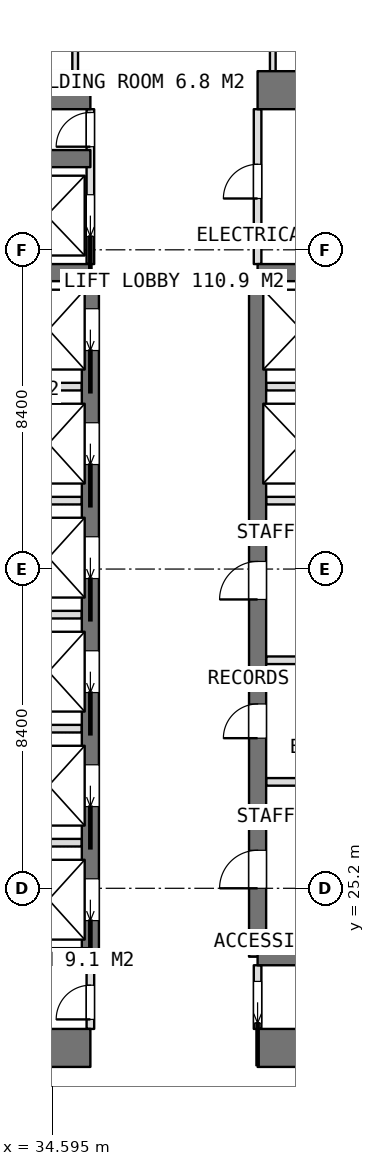
"""IFC4 building model, lengths in metres.
Left out: names, types, materials, properties, quantities, classifications, styles, units other than length and angle.
Written with IfcOpenShell. Run it as: python <this file> out.ifc"""

import sys

from ifc_helpers import new_model, si_unit, direction, frame, frame_2d, origin, place, context, subcontext, project, spatial, rectangle, extrude, element, fill, save


model = new_model("IFC4")
c1 = context("Model", 3, precision=1e-05, world=origin(), true_north=direction((0.0, 1.0)))
c2 = subcontext(c1, "Body", "Model", "MODEL_VIEW")
j1 = project(units=[si_unit("LENGTHUNIT", "METRE"), si_unit("PLANEANGLEUNIT", "RADIAN")], contexts=[c1])
p1 = place(None, origin())
s1 = spatial("IfcSite", under=j1, at=p1, CompositionType="ELEMENT")
p2 = place(p1, origin())
s2 = spatial("IfcBuilding", under=s1, at=p2, CompositionType="ELEMENT")
p3 = place(p2, frame((0.0, 0.0, 183.95)))
s3 = spatial("IfcBuildingStorey", under=s2, at=p3, CompositionType="ELEMENT", Elevation=183.95)
p4 = place(p3, frame((25.2, 21.0, 0.0), z_axis=(0.0, 0.0, 1.0), x_axis=(1.0, 0.0, 0.0)))
e1 = element("IfcWall", 1, at=p4, inside=s3, PredefinedType="SHEAR", context=c2, shape_type="SweptSolid", body=[
    extrude(rectangle(XDim=10.4, YDim=1.0, at=frame_2d((5.2, 0.0))), origin(), (0.0, 0.0, 1.0), 3.75),
])
p5 = place(p3, frame((40.0, 21.0, 0.0), z_axis=(0.0, 0.0, 1.0), x_axis=(1.0, 0.0, 0.0)))
e2 = element("IfcWall", 2, at=p5, inside=s3, PredefinedType="SHEAR", context=c2, shape_type="SweptSolid", body=[
    extrude(rectangle(XDim=10.4, YDim=1.0, at=frame_2d((5.2, 0.0))), origin(), (0.0, 0.0, 1.0), 3.75),
])
p6 = place(p3, frame((25.2, 46.2, 0.0), z_axis=(0.0, 0.0, 1.0), x_axis=(1.0, 0.0, 0.0)))
e3 = element("IfcWall", 3, at=p6, inside=s3, PredefinedType="SHEAR", context=c2, shape_type="SweptSolid", body=[
    extrude(rectangle(XDim=10.4, YDim=1.0, at=frame_2d((5.2, 0.0))), origin(), (0.0, 0.0, 1.0), 3.75),
])
p7 = place(p3, frame((40.0, 46.2, 0.0), z_axis=(0.0, 0.0, 1.0), x_axis=(1.0, 0.0, 0.0)))
e4 = element("IfcWall", 4, at=p7, inside=s3, PredefinedType="SHEAR", context=c2, shape_type="SweptSolid", body=[
    extrude(rectangle(XDim=10.4, YDim=1.0, at=frame_2d((5.2, 0.0))), origin(), (0.0, 0.0, 1.0), 3.75),
])
p8 = place(p3, frame((35.6, 23.4, 0.0), z_axis=(0.0, 0.0, 1.0), x_axis=(0.0, 1.0, 0.0)))
e5 = element("IfcWall", 5, at=p8, inside=s3, PredefinedType="SHEAR", context=c2, shape_type="SweptSolid", body=[
    extrude(rectangle(XDim=18.0, YDim=0.45, at=frame_2d((9.0, 0.0))), origin(), (0.0, 0.0, 1.0), 3.75),
])
p9 = place(p8, frame((0.95, 0.0, 0.0)))
e6 = element("IfcOpeningElement", 6, at=p9, cuts=e5, PredefinedType="OPENING", context=c2, shape_type="SweptSolid", body=[
    extrude(rectangle(XDim=1.1, YDim=2.1, at=frame_2d((0.55, 1.05))), frame((0.0, 0.235, 0.0), z_axis=(0.0, -1.0, 0.0), x_axis=(1.0, 0.0, 0.0)), (0.0, 0.0, 1.0), 0.47),
])
p10 = place(p8, frame((3.95, 0.0, 0.0)))
e7 = element("IfcOpeningElement", 7, at=p10, cuts=e5, PredefinedType="OPENING", context=c2, shape_type="SweptSolid", body=[
    extrude(rectangle(XDim=1.1, YDim=2.1, at=frame_2d((0.55, 1.05))), frame((0.0, 0.235, 0.0), z_axis=(0.0, -1.0, 0.0), x_axis=(1.0, 0.0, 0.0)), (0.0, 0.0, 1.0), 0.47),
])
p11 = place(p8, frame((6.95, 0.0, 0.0)))
e8 = element("IfcOpeningElement", 8, at=p11, cuts=e5, PredefinedType="OPENING", context=c2, shape_type="SweptSolid", body=[
    extrude(rectangle(XDim=1.1, YDim=2.1, at=frame_2d((0.55, 1.05))), frame((0.0, 0.235, 0.0), z_axis=(0.0, -1.0, 0.0), x_axis=(1.0, 0.0, 0.0)), (0.0, 0.0, 1.0), 0.47),
])
p12 = place(p8, frame((9.95, 0.0, 0.0)))
e9 = element("IfcOpeningElement", 9, at=p12, cuts=e5, PredefinedType="OPENING", context=c2, shape_type="SweptSolid", body=[
    extrude(rectangle(XDim=1.1, YDim=2.1, at=frame_2d((0.55, 1.05))), frame((0.0, 0.235, 0.0), z_axis=(0.0, -1.0, 0.0), x_axis=(1.0, 0.0, 0.0)), (0.0, 0.0, 1.0), 0.47),
])
p13 = place(p8, frame((12.95, 0.0, 0.0)))
e10 = element("IfcOpeningElement", 10, at=p13, cuts=e5, PredefinedType="OPENING", context=c2, shape_type="SweptSolid", body=[
    extrude(rectangle(XDim=1.1, YDim=2.1, at=frame_2d((0.55, 1.05))), frame((0.0, 0.235, 0.0), z_axis=(0.0, -1.0, 0.0), x_axis=(1.0, 0.0, 0.0)), (0.0, 0.0, 1.0), 0.47),
])
p14 = place(p8, frame((15.95, 0.0, 0.0)))
e11 = element("IfcOpeningElement", 11, at=p14, cuts=e5, PredefinedType="OPENING", context=c2, shape_type="SweptSolid", body=[
    extrude(rectangle(XDim=1.1, YDim=2.1, at=frame_2d((0.55, 1.05))), frame((0.0, 0.235, 0.0), z_axis=(0.0, -1.0, 0.0), x_axis=(1.0, 0.0, 0.0)), (0.0, 0.0, 1.0), 0.47),
])
p15 = place(p3, frame((40.0, 23.4, 0.0), z_axis=(0.0, 0.0, 1.0), x_axis=(0.0, 1.0, 0.0)))
e12 = element("IfcWall", 12, at=p15, inside=s3, PredefinedType="SHEAR", context=c2, shape_type="SweptSolid", body=[
    extrude(rectangle(XDim=18.0, YDim=0.45, at=frame_2d((9.0, 0.0))), origin(), (0.0, 0.0, 1.0), 3.75),
])
p16 = place(p15, frame((1.8, 0.0, 0.0)))
e13 = element("IfcOpeningElement", 13, at=p16, cuts=e12, PredefinedType="OPENING", context=c2, shape_type="SweptSolid", body=[
    extrude(rectangle(XDim=1.0, YDim=2.1, at=frame_2d((0.5, 1.05))), frame((0.0, 0.235, 0.0), z_axis=(0.0, -1.0, 0.0), x_axis=(1.0, 0.0, 0.0)), (0.0, 0.0, 1.0), 0.47),
])
p17 = place(p15, frame((5.75, 0.0, 0.0)))
e14 = element("IfcOpeningElement", 14, at=p17, cuts=e12, PredefinedType="OPENING", context=c2, shape_type="SweptSolid", body=[
    extrude(rectangle(XDim=0.9, YDim=2.1, at=frame_2d((0.45, 1.05))), frame((0.0, 0.235, 0.0), z_axis=(0.0, -1.0, 0.0), x_axis=(1.0, 0.0, 0.0)), (0.0, 0.0, 1.0), 0.47),
])
p18 = place(p15, frame((9.4, 0.0, 0.0)))
e15 = element("IfcOpeningElement", 15, at=p18, cuts=e12, PredefinedType="OPENING", context=c2, shape_type="SweptSolid", body=[
    extrude(rectangle(XDim=1.0, YDim=2.1, at=frame_2d((0.5, 1.05))), frame((0.0, 0.235, 0.0), z_axis=(0.0, -1.0, 0.0), x_axis=(1.0, 0.0, 0.0)), (0.0, 0.0, 1.0), 0.47),
])
for number, where, z_axis, x_axis in (
    (16, (31.8, 23.4, 0.0), (0.0, 0.0, 1.0), (1.0, 0.0, 0.0)),
    (17, (31.8, 41.4, 0.0), (0.0, 0.0, 1.0), (1.0, 0.0, 0.0)),
    (18, (31.8, 44.4, 0.0), (0.0, 0.0, 1.0), (1.0, 0.0, 0.0)),
    (19, (40.0, 23.4, 0.0), (0.0, 0.0, 1.0), (1.0, 0.0, 0.0)),
    (20, (40.0, 41.4, 0.0), (0.0, 0.0, 1.0), (1.0, 0.0, 0.0)),
):
    element("IfcWall", number, at=place(p3, frame(where, z_axis=z_axis, x_axis=x_axis)), inside=s3, PredefinedType="SHEAR", context=c2, shape_type="SweptSolid", body=[
        extrude(rectangle(XDim=3.8, YDim=0.45, at=frame_2d((1.9, 0.0))), origin(), (0.0, 0.0, 1.0), 3.75),
    ])
for number, where, z_axis, x_axis in (
    (21, (32.025, 26.4, 0.0), (0.0, 0.0, 1.0), (1.0, 0.0, 0.0)),
    (22, (32.025, 29.4, 0.0), (0.0, 0.0, 1.0), (1.0, 0.0, 0.0)),
    (23, (32.025, 32.4, 0.0), (0.0, 0.0, 1.0), (1.0, 0.0, 0.0)),
    (24, (32.025, 35.4, 0.0), (0.0, 0.0, 1.0), (1.0, 0.0, 0.0)),
    (25, (32.025, 38.4, 0.0), (0.0, 0.0, 1.0), (1.0, 0.0, 0.0)),
):
    element("IfcWall", number, at=place(p3, frame(where, z_axis=z_axis, x_axis=x_axis)), inside=s3, PredefinedType="PARTITIONING", context=c2, shape_type="SweptSolid", body=[
        extrude(rectangle(XDim=3.35, YDim=0.2, at=frame_2d((1.675, 0.0))), origin(), (0.0, 0.0, 1.0), 3.5),
    ])
for number, where, z_axis, x_axis in (
    (26, (40.225, 35.4, 0.0), (0.0, 0.0, 1.0), (1.0, 0.0, 0.0)),
    (27, (40.225, 38.4, 0.0), (0.0, 0.0, 1.0), (1.0, 0.0, 0.0)),
):
    element("IfcWall", number, at=place(p3, frame(where, z_axis=z_axis, x_axis=x_axis)), inside=s3, PredefinedType="PARTITIONING", context=c2, shape_type="SweptSolid", body=[
        extrude(rectangle(XDim=3.35, YDim=0.2, at=frame_2d((1.675, 0.0))), origin(), (0.0, 0.0, 1.0), 3.5),
    ])
p19 = place(p3, frame((40.0, 21.5, 0.0), z_axis=(0.0, 0.0, 1.0), x_axis=(0.0, 1.0, 0.0)))
e28 = element("IfcWall", 28, at=p19, inside=s3, PredefinedType="PARTITIONING", context=c2, shape_type="SweptSolid", body=[
    extrude(rectangle(XDim=1.675, YDim=0.2, at=frame_2d((0.837, 0.0))), origin(), (0.0, 0.0, 1.0), 3.5),
])
p20 = place(p19, frame((0.15, 0.0, 0.0)))
e29 = element("IfcOpeningElement", 29, at=p20, cuts=e28, PredefinedType="OPENING", context=c2, shape_type="SweptSolid", body=[
    extrude(rectangle(XDim=1.1, YDim=2.1, at=frame_2d((0.55, 1.05))), frame((0.0, 0.11, 0.0), z_axis=(0.0, -1.0, 0.0), x_axis=(1.0, 0.0, 0.0)), (0.0, 0.0, 1.0), 0.22),
])
p21 = place(p3, frame((40.0, 41.625, 0.0), z_axis=(0.0, 0.0, 1.0), x_axis=(0.0, 1.0, 0.0)))
e30 = element("IfcWall", 30, at=p21, inside=s3, PredefinedType="PARTITIONING", context=c2, shape_type="SweptSolid", body=[
    extrude(rectangle(XDim=4.075, YDim=0.2, at=frame_2d((2.038, 0.0))), origin(), (0.0, 0.0, 1.0), 3.5),
])
p22 = place(p21, frame((1.725, 0.0, 0.0)))
e31 = element("IfcOpeningElement", 31, at=p22, cuts=e30, PredefinedType="OPENING", context=c2, shape_type="SweptSolid", body=[
    extrude(rectangle(XDim=0.9, YDim=2.1, at=frame_2d((0.45, 1.05))), frame((0.0, 0.11, 0.0), z_axis=(0.0, -1.0, 0.0), x_axis=(1.0, 0.0, 0.0)), (0.0, 0.0, 1.0), 0.22),
])
p23 = place(p3, frame((35.6, 41.625, 0.0), z_axis=(0.0, 0.0, 1.0), x_axis=(0.0, 1.0, 0.0)))
e32 = element("IfcWall", 32, at=p23, inside=s3, PredefinedType="PARTITIONING", context=c2, shape_type="SweptSolid", body=[
    extrude(rectangle(XDim=4.075, YDim=0.2, at=frame_2d((2.038, 0.0))), origin(), (0.0, 0.0, 1.0), 3.5),
])
p24 = place(p23, frame((3.088, 0.0, 0.0)))
e33 = element("IfcOpeningElement", 33, at=p24, cuts=e32, PredefinedType="OPENING", context=c2, shape_type="SweptSolid", body=[
    extrude(rectangle(XDim=0.9, YDim=2.1, at=frame_2d((0.45, 1.05))), frame((0.0, 0.11, 0.0), z_axis=(0.0, -1.0, 0.0), x_axis=(1.0, 0.0, 0.0)), (0.0, 0.0, 1.0), 0.22),
])
p25 = place(p23, frame((0.725, 0.0, 0.0)))
e34 = element("IfcOpeningElement", 34, at=p25, cuts=e32, PredefinedType="OPENING", context=c2, shape_type="SweptSolid", body=[
    extrude(rectangle(XDim=1.1, YDim=2.1, at=frame_2d((0.55, 1.05))), frame((0.0, 0.11, 0.0), z_axis=(0.0, -1.0, 0.0), x_axis=(1.0, 0.0, 0.0)), (0.0, 0.0, 1.0), 0.22),
])
p26 = place(p3, frame((35.6, 21.5, 0.0), z_axis=(0.0, 0.0, 1.0), x_axis=(0.0, 1.0, 0.0)))
e35 = element("IfcWall", 35, at=p26, inside=s3, PredefinedType="PARTITIONING", context=c2, shape_type="SweptSolid", body=[
    extrude(rectangle(XDim=1.675, YDim=0.2, at=frame_2d((0.837, 0.0))), origin(), (0.0, 0.0, 1.0), 3.5),
])
p27 = place(p26, frame((0.25, 0.0, 0.0)))
e36 = element("IfcOpeningElement", 36, at=p27, cuts=e35, PredefinedType="OPENING", context=c2, shape_type="SweptSolid", body=[
    extrude(rectangle(XDim=0.9, YDim=2.1, at=frame_2d((0.45, 1.05))), frame((0.0, 0.11, 0.0), z_axis=(0.0, -1.0, 0.0), x_axis=(1.0, 0.0, 0.0)), (0.0, 0.0, 1.0), 0.22),
])
for number, where, z_axis, x_axis in (
    (37, (40.225, 28.0, 0.0), (0.0, 0.0, 1.0), (1.0, 0.0, 0.0)),
    (38, (40.225, 31.2, 0.0), (0.0, 0.0, 1.0), (1.0, 0.0, 0.0)),
):
    element("IfcWall", number, at=place(p3, frame(where, z_axis=z_axis, x_axis=x_axis)), inside=s3, PredefinedType="PARTITIONING", context=c2, shape_type="SweptSolid", body=[
        extrude(rectangle(XDim=3.35, YDim=0.2, at=frame_2d((1.675, 0.0))), origin(), (0.0, 0.0, 1.0), 3.5),
    ])
for number, where, z_axis, x_axis in (
    (39, (40.4, 46.7, 0.0), (0.0, 0.0, 1.0), (0.0, 1.0, 0.0)),
    (40, (35.2, 46.7, 0.0), (0.0, 0.0, 1.0), (0.0, 1.0, 0.0)),
):
    element("IfcWall", number, at=place(p3, frame(where, z_axis=z_axis, x_axis=x_axis)), inside=s3, PredefinedType="PARTITIONING", context=c2, shape_type="SweptSolid", body=[
        extrude(rectangle(XDim=2.625, YDim=0.15, at=frame_2d((1.312, 0.0))), origin(), (0.0, 0.0, 1.0), 3.5),
    ])
p28 = place(p20, origin())
e41 = element("IfcDoor", 41, at=p28, inside=s3, OperationType="SLIDING_TO_LEFT", PredefinedType="DOOR", context=c2, shape_type="SweptSolid", body=[
    extrude(rectangle(XDim=1.1, YDim=2.1, at=frame_2d((0.55, 1.05))), frame((0.0, 0.025, 0.0), z_axis=(0.0, -1.0, 0.0), x_axis=(1.0, 0.0, 0.0)), (0.0, 0.0, 1.0), 0.05),
])
fill(e29, e41)
p29 = place(p27, origin())
e42 = element("IfcDoor", 42, at=p29, inside=s3, OperationType="SINGLE_SWING_LEFT", PredefinedType="DOOR", context=c2, shape_type="SweptSolid", body=[
    extrude(rectangle(XDim=0.9, YDim=2.1, at=frame_2d((0.45, 1.05))), frame((0.0, 0.025, 0.0), z_axis=(0.0, -1.0, 0.0), x_axis=(1.0, 0.0, 0.0)), (0.0, 0.0, 1.0), 0.05),
])
fill(e36, e42)
p30 = place(p22, origin())
e43 = element("IfcDoor", 43, at=p30, inside=s3, OperationType="SINGLE_SWING_LEFT", PredefinedType="DOOR", context=c2, shape_type="SweptSolid", body=[
    extrude(rectangle(XDim=0.9, YDim=2.1, at=frame_2d((0.45, 1.05))), frame((0.0, 0.025, 0.0), z_axis=(0.0, -1.0, 0.0), x_axis=(1.0, 0.0, 0.0)), (0.0, 0.0, 1.0), 0.05),
])
fill(e31, e43)
p31 = place(p16, origin())
e44 = element("IfcDoor", 44, at=p31, inside=s3, OperationType="SINGLE_SWING_LEFT", PredefinedType="DOOR", context=c2, shape_type="SweptSolid", body=[
    extrude(rectangle(XDim=1.0, YDim=2.1, at=frame_2d((0.5, 1.05))), frame((0.0, 0.025, 0.0), z_axis=(0.0, -1.0, 0.0), x_axis=(1.0, 0.0, 0.0)), (0.0, 0.0, 1.0), 0.05),
])
fill(e13, e44)
p32 = place(p17, origin())
e45 = element("IfcDoor", 45, at=p32, inside=s3, OperationType="SINGLE_SWING_LEFT", PredefinedType="DOOR", context=c2, shape_type="SweptSolid", body=[
    extrude(rectangle(XDim=0.9, YDim=2.1, at=frame_2d((0.45, 1.05))), frame((0.0, 0.025, 0.0), z_axis=(0.0, -1.0, 0.0), x_axis=(1.0, 0.0, 0.0)), (0.0, 0.0, 1.0), 0.05),
])
fill(e14, e45)
p33 = place(p18, origin())
e46 = element("IfcDoor", 46, at=p33, inside=s3, OperationType="SINGLE_SWING_LEFT", PredefinedType="DOOR", context=c2, shape_type="SweptSolid", body=[
    extrude(rectangle(XDim=1.0, YDim=2.1, at=frame_2d((0.5, 1.05))), frame((0.0, 0.025, 0.0), z_axis=(0.0, -1.0, 0.0), x_axis=(1.0, 0.0, 0.0)), (0.0, 0.0, 1.0), 0.05),
])
fill(e15, e46)
p34 = place(p24, origin())
e47 = element("IfcDoor", 47, at=p34, inside=s3, OperationType="SINGLE_SWING_LEFT", PredefinedType="DOOR", context=c2, shape_type="SweptSolid", body=[
    extrude(rectangle(XDim=0.9, YDim=2.1, at=frame_2d((0.45, 1.05))), frame((0.0, 0.025, 0.0), z_axis=(0.0, -1.0, 0.0), x_axis=(1.0, 0.0, 0.0)), (0.0, 0.0, 1.0), 0.05),
])
fill(e33, e47)
p35 = place(p9, origin())
e48 = element("IfcDoor", 48, at=p35, inside=s3, OperationType="SLIDING_TO_LEFT", PredefinedType="USERDEFINED", context=c2, shape_type="SweptSolid", body=[
    extrude(rectangle(XDim=1.1, YDim=2.1, at=frame_2d((0.55, 1.05))), frame((0.0, 0.025, 0.0), z_axis=(0.0, -1.0, 0.0), x_axis=(1.0, 0.0, 0.0)), (0.0, 0.0, 1.0), 0.05),
])
fill(e6, e48)
p36 = place(p10, origin())
e49 = element("IfcDoor", 49, at=p36, inside=s3, OperationType="SLIDING_TO_LEFT", PredefinedType="USERDEFINED", context=c2, shape_type="SweptSolid", body=[
    extrude(rectangle(XDim=1.1, YDim=2.1, at=frame_2d((0.55, 1.05))), frame((0.0, 0.025, 0.0), z_axis=(0.0, -1.0, 0.0), x_axis=(1.0, 0.0, 0.0)), (0.0, 0.0, 1.0), 0.05),
])
fill(e7, e49)
p37 = place(p11, origin())
e50 = element("IfcDoor", 50, at=p37, inside=s3, OperationType="SLIDING_TO_LEFT", PredefinedType="USERDEFINED", context=c2, shape_type="SweptSolid", body=[
    extrude(rectangle(XDim=1.1, YDim=2.1, at=frame_2d((0.55, 1.05))), frame((0.0, 0.025, 0.0), z_axis=(0.0, -1.0, 0.0), x_axis=(1.0, 0.0, 0.0)), (0.0, 0.0, 1.0), 0.05),
])
fill(e8, e50)
p38 = place(p12, origin())
e51 = element("IfcDoor", 51, at=p38, inside=s3, OperationType="SLIDING_TO_LEFT", PredefinedType="USERDEFINED", context=c2, shape_type="SweptSolid", body=[
    extrude(rectangle(XDim=1.1, YDim=2.1, at=frame_2d((0.55, 1.05))), frame((0.0, 0.025, 0.0), z_axis=(0.0, -1.0, 0.0), x_axis=(1.0, 0.0, 0.0)), (0.0, 0.0, 1.0), 0.05),
])
fill(e9, e51)
p39 = place(p13, origin())
e52 = element("IfcDoor", 52, at=p39, inside=s3, OperationType="SLIDING_TO_LEFT", PredefinedType="USERDEFINED", context=c2, shape_type="SweptSolid", body=[
    extrude(rectangle(XDim=1.1, YDim=2.1, at=frame_2d((0.55, 1.05))), frame((0.0, 0.025, 0.0), z_axis=(0.0, -1.0, 0.0), x_axis=(1.0, 0.0, 0.0)), (0.0, 0.0, 1.0), 0.05),
])
fill(e10, e52)
p40 = place(p14, origin())
e53 = element("IfcDoor", 53, at=p40, inside=s3, OperationType="SLIDING_TO_LEFT", PredefinedType="USERDEFINED", context=c2, shape_type="SweptSolid", body=[
    extrude(rectangle(XDim=1.1, YDim=2.1, at=frame_2d((0.55, 1.05))), frame((0.0, 0.025, 0.0), z_axis=(0.0, -1.0, 0.0), x_axis=(1.0, 0.0, 0.0)), (0.0, 0.0, 1.0), 0.05),
])
fill(e11, e53)
p41 = place(p25, origin())
e54 = element("IfcDoor", 54, at=p41, inside=s3, OperationType="SLIDING_TO_LEFT", PredefinedType="USERDEFINED", context=c2, shape_type="SweptSolid", body=[
    extrude(rectangle(XDim=1.1, YDim=2.1, at=frame_2d((0.55, 1.05))), frame((0.0, 0.025, 0.0), z_axis=(0.0, -1.0, 0.0), x_axis=(1.0, 0.0, 0.0)), (0.0, 0.0, 1.0), 0.05),
])
fill(e34, e54)
save(model, sys.argv[1])
